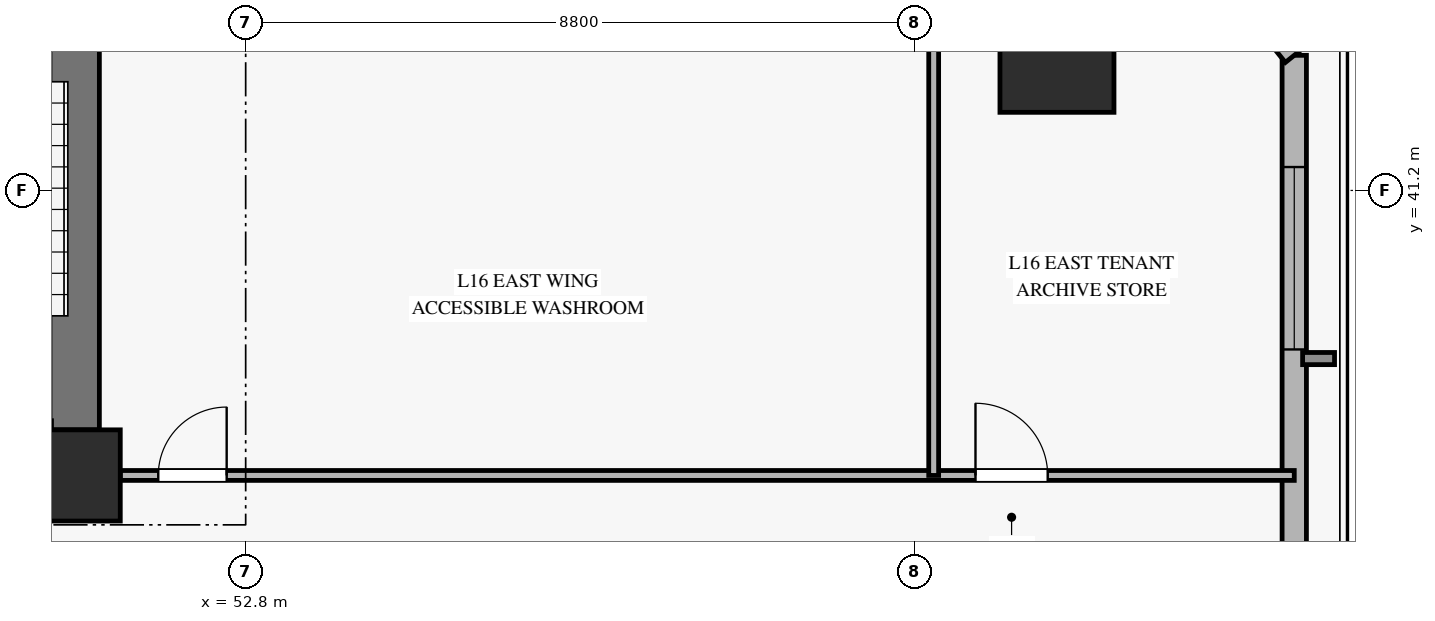
"""IFC4 building model, lengths in metres.
Left out: names, types, materials, properties, quantities, classifications, styles, units other than length and angle.
Written with IfcOpenShell. Run it as: python <this file> out.ifc"""

import sys

from ifc_helpers import new_model, si_unit, direction, frame, frame_2d, origin, origin_2d, place, context, subcontext, project, spatial, rectangle, hollow_rectangle, extrude, source, transform, mapped, element, fill, save


model = new_model("IFC4")
c1 = context("Model", 3, precision=1e-05, world=origin(), true_north=direction((0.0, 1.0)))
c2 = subcontext(c1, "Body", "Model", "MODEL_VIEW")
j1 = project(units=[si_unit("LENGTHUNIT", "METRE"), si_unit("PLANEANGLEUNIT", "RADIAN")], contexts=[c1])
p1 = place(None, origin())
s1 = spatial("IfcSite", under=j1, at=p1, CompositionType="ELEMENT")
p2 = place(p1, origin())
s2 = spatial("IfcBuilding", under=s1, at=p2, CompositionType="ELEMENT")
p3 = place(p2, frame((0.0, 0.0, 65.0)))
s3 = spatial("IfcBuildingStorey", under=s2, at=p3, CompositionType="ELEMENT", Elevation=65.0)
m1 = source(origin(), c2, "Body", "SweptSolid", [
    extrude(rectangle(XDim=1.2, YDim=1.2, at=origin_2d()), origin(), (0.0, 0.0, 1.0), 3.68),
])
p4 = place(p3, frame((50.55, 37.45, 0.0), z_axis=(0.0, 0.0, 1.0), x_axis=(1.0, 0.0, 0.0)))
e1 = element("IfcColumn", 1, at=p4, inside=s3, PredefinedType="PILASTER", context=c2, shape_type="MappedRepresentation", body=[
    mapped(m1, transform((0.0, 0.0, 0.0), x_axis=(1.0, 0.0, 0.0), y_axis=(0.0, 1.0, 0.0), z_axis=(0.0, 0.0, 1.0), scale=1.0)),
])
p5 = place(p3, frame((50.55, 38.05, 0.0), z_axis=(0.0, 0.0, 1.0), x_axis=(0.0, 1.0, 0.0)))
e2 = element("IfcWall", 2, at=p5, inside=s3, PredefinedType="SHEAR", context=c2, shape_type="SweptSolid", body=[
    extrude(rectangle(XDim=7.9, YDim=0.65, at=frame_2d((3.95, 0.0))), origin(), (0.0, 0.0, 1.0), 3.68),
])
m2 = source(origin(), c2, "Body", "SweptSolid", [
    extrude(hollow_rectangle(XDim=1.5, YDim=1.5, WallThickness=0.07, at=origin_2d()), origin(), (0.0, 0.0, 1.0), 3.68),
])
p6 = place(p3, frame((63.474, 42.978, 0.0), z_axis=(0.0, 0.0, 1.0), x_axis=(1.0, 0.0, 0.0)))
e3 = element("IfcColumn", 3, at=p6, inside=s3, PredefinedType="COLUMN", context=c2, shape_type="MappedRepresentation", body=[
    mapped(m2, transform((0.0, 0.0, 0.0), x_axis=(1.0, 0.0, 0.0), y_axis=(0.0, 1.0, 0.0), z_axis=(0.0, 0.0, 1.0), scale=1.0)),
])
p7 = place(p3, frame((66.596, 25.991, 0.0), z_axis=(0.0, 0.0, 1.0), x_axis=(0.0, 1.0, 0.0)))
e4 = element("IfcWall", 4, at=p7, inside=s3, PredefinedType="SOLIDWALL", context=c2, shape_type="SweptSolid", body=[
    extrude(rectangle(XDim=16.987, YDim=0.32, at=frame_2d((8.494, 0.0))), origin(), (0.0, 0.0, 1.0), 3.16),
])
p8 = place(p7, frame((1.353, 0.0, 0.45)))
e5 = element("IfcOpeningElement", 5, at=p8, cuts=e4, PredefinedType="OPENING", context=c2, shape_type="SweptSolid", body=[
    extrude(rectangle(XDim=2.4, YDim=2.1, at=frame_2d((1.2, 1.05))), frame((0.0, 0.17, 0.0), z_axis=(0.0, -1.0, 0.0), x_axis=(1.0, 0.0, 0.0)), (0.0, 0.0, 1.0), 0.34),
])
p9 = place(p7, frame((13.117, 0.0, 0.45)))
e6 = element("IfcOpeningElement", 6, at=p9, cuts=e4, PredefinedType="OPENING", context=c2, shape_type="SweptSolid", body=[
    extrude(rectangle(XDim=2.4, YDim=2.1, at=frame_2d((1.2, 1.05))), frame((0.0, 0.17, 0.0), z_axis=(0.0, -1.0, 0.0), x_axis=(1.0, 0.0, 0.0)), (0.0, 0.0, 1.0), 0.34),
])
p10 = place(p3, frame((66.596, 42.978, 0.0), z_axis=(0.0, 0.0, 1.0), x_axis=(-0.625312639048, 0.780374335461, 0.0)))
e7 = element("IfcWall", 7, at=p10, inside=s3, PredefinedType="SOLIDWALL", context=c2, shape_type="SweptSolid", body=[
    extrude(rectangle(XDim=4.193, YDim=0.3, at=frame_2d((2.096, 0.0))), origin(), (0.0, 0.0, 1.0), 3.16),
])
p11 = place(p10, frame((1.296, 0.0, 0.45)))
e8 = element("IfcOpeningElement", 8, at=p11, cuts=e7, PredefinedType="OPENING", context=c2, shape_type="SweptSolid", body=[
    extrude(rectangle(XDim=1.6, YDim=2.0, at=frame_2d((0.8, 1.0))), frame((0.0, 0.16, 0.0), z_axis=(0.0, -1.0, 0.0), x_axis=(1.0, 0.0, 0.0)), (0.0, 0.0, 1.0), 0.32),
])
p12 = place(p3, frame((51.15, 37.45, 0.0), z_axis=(0.0, 0.0, 1.0), x_axis=(1.0, 0.0, 0.0)))
e9 = element("IfcWall", 9, at=p12, inside=s3, PredefinedType="PARTITIONING", context=c2, shape_type="SweptSolid", body=[
    extrude(rectangle(XDim=15.446, YDim=0.13, at=frame_2d((7.723, 0.0))), origin(), (0.0, 0.0, 1.0), 3.165),
])
p13 = place(p12, frame((0.5, 0.0, 0.0)))
e10 = element("IfcOpeningElement", 10, at=p13, cuts=e9, PredefinedType="OPENING", context=c2, shape_type="SweptSolid", body=[
    extrude(rectangle(XDim=0.9, YDim=2.1, at=frame_2d((0.45, 1.05))), frame((0.0, 0.075, 0.0), z_axis=(0.0, -1.0, 0.0), x_axis=(1.0, 0.0, 0.0)), (0.0, 0.0, 1.0), 0.15),
])
p14 = place(p12, frame((11.252, 0.0, 0.0)))
e11 = element("IfcOpeningElement", 11, at=p14, cuts=e9, PredefinedType="OPENING", context=c2, shape_type="SweptSolid", body=[
    extrude(rectangle(XDim=0.95, YDim=2.1, at=frame_2d((0.475, 1.05))), frame((0.0, 0.075, 0.0), z_axis=(0.0, -1.0, 0.0), x_axis=(1.0, 0.0, 0.0)), (0.0, 0.0, 1.0), 0.15),
])
p15 = place(p3, frame((61.852, 37.45, 0.0), z_axis=(0.0, 0.0, 1.0), x_axis=(0.0, 1.0, 0.0)))
e12 = element("IfcWall", 12, at=p15, inside=s3, PredefinedType="PARTITIONING", context=c2, shape_type="SweptSolid", body=[
    extrude(rectangle(XDim=8.8, YDim=0.13, at=frame_2d((4.4, 0.0))), origin(), (0.0, 0.0, 1.0), 3.68),
])
m3 = source(origin(), c2, "Body", "SweptSolid", [
    extrude(rectangle(XDim=2.4, YDim=2.1, at=frame_2d((1.2, 1.05))), frame((0.0, 0.03, 0.0), z_axis=(0.0, -1.0, 0.0), x_axis=(1.0, 0.0, 0.0)), (0.0, 0.0, 1.0), 0.06),
])
p16 = place(p9, origin())
e13 = element("IfcWindow", 13, at=p16, inside=s3, PartitioningType="SINGLE_PANEL", PredefinedType="WINDOW", context=c2, shape_type="MappedRepresentation", body=[
    mapped(m3, transform((0.0, 0.0, 0.0), x_axis=(1.0, 0.0, 0.0), y_axis=(0.0, 1.0, 0.0), z_axis=(0.0, 0.0, 1.0), scale=1.0)),
])
fill(e6, e13)
m4 = source(origin(), c2, "Body", "SweptSolid", [
    extrude(rectangle(XDim=0.9, YDim=2.1, at=frame_2d((0.45, 1.05))), frame((0.0, 0.025, 0.0), z_axis=(0.0, -1.0, 0.0), x_axis=(1.0, 0.0, 0.0)), (0.0, 0.0, 1.0), 0.05),
])
p17 = place(p13, origin())
e14 = element("IfcDoor", 14, at=p17, inside=s3, OperationType="SINGLE_SWING_RIGHT", PredefinedType="DOOR", context=c2, shape_type="MappedRepresentation", body=[
    mapped(m4, transform((0.0, 0.0, 0.0), x_axis=(1.0, 0.0, 0.0), y_axis=(0.0, 1.0, 0.0), z_axis=(0.0, 0.0, 1.0), scale=1.0)),
])
fill(e10, e14)
m5 = source(origin(), c2, "Body", "SweptSolid", [
    extrude(rectangle(XDim=0.95, YDim=2.1, at=frame_2d((0.475, 1.05))), frame((0.0, 0.025, 0.0), z_axis=(0.0, -1.0, 0.0), x_axis=(1.0, 0.0, 0.0)), (0.0, 0.0, 1.0), 0.05),
])
p18 = place(p14, origin())
e15 = element("IfcDoor", 15, at=p18, inside=s3, OperationType="SINGLE_SWING_LEFT", PredefinedType="DOOR", context=c2, shape_type="MappedRepresentation", body=[
    mapped(m5, transform((0.0, 0.0, 0.0), x_axis=(1.0, 0.0, 0.0), y_axis=(0.0, 1.0, 0.0), z_axis=(0.0, 0.0, 1.0), scale=1.0)),
])
fill(e11, e15)
save(model, sys.argv[1])
